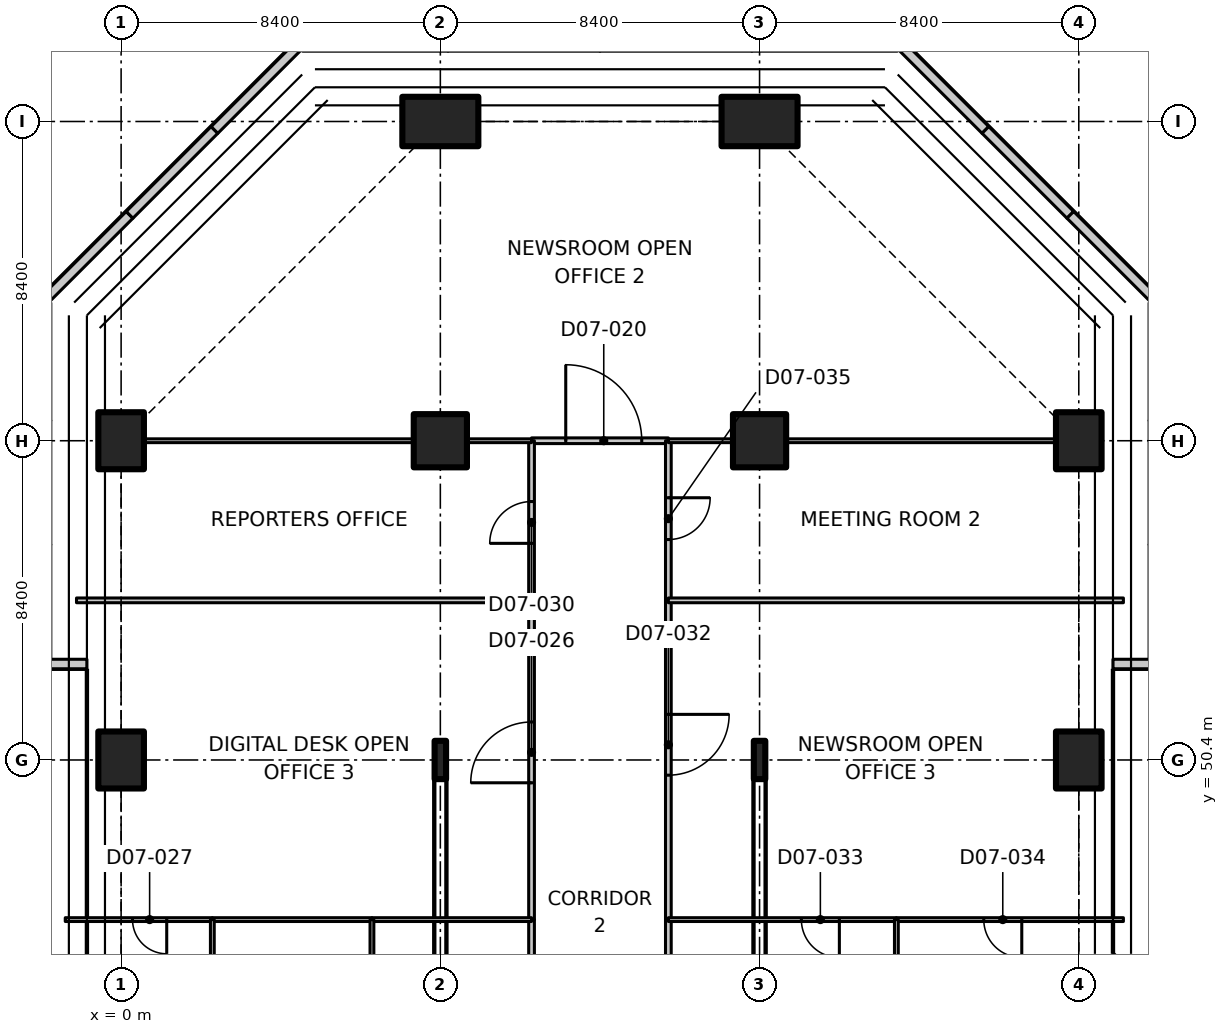
"""IFC4 building model, lengths in metres.
Left out: names, types, materials, properties, quantities, classifications, styles, units other than length and angle.
Written with IfcOpenShell. Run it as: python <this file> out.ifc"""

import sys

from ifc_helpers import new_model, si_unit, direction, frame, frame_2d, origin, origin_2d, place, context, subcontext, project, spatial, polyline, rectangle, i_section, outline, extrude, element, fill, save


model = new_model("IFC4")
c1 = context("Model", 3, precision=1e-05, world=origin(), true_north=direction((0.0, 1.0)))
c2 = subcontext(c1, "Body", "Model", "MODEL_VIEW")
j1 = project(units=[si_unit("LENGTHUNIT", "METRE"), si_unit("PLANEANGLEUNIT", "RADIAN")], contexts=[c1])
p1 = place(None, origin())
s1 = spatial("IfcSite", under=j1, at=p1, CompositionType="ELEMENT")
p2 = place(p1, origin())
s2 = spatial("IfcBuilding", under=s1, at=p2, CompositionType="ELEMENT")
p3 = place(p2, frame((0.0, 0.0, 36.5)))
s3 = spatial("IfcBuildingStorey", under=s2, at=p3, CompositionType="ELEMENT", Elevation=36.5)
for number, where, z_axis, x_axis in (
    (1, (0.0, 50.4, 0.0), (0.0, 0.0, 1.0), (1.0, 0.0, 0.0)),
    (2, (0.0, 58.8, 0.0), (0.0, 0.0, 1.0), (1.0, 0.0, 0.0)),
):
    element("IfcColumn", number, at=place(p3, frame(where, z_axis=z_axis, x_axis=x_axis)), inside=s3, PredefinedType="COLUMN", context=c2, shape_type="SweptSolid", body=[
        extrude(rectangle(XDim=1.2, YDim=1.5, at=origin_2d()), origin(), (0.0, 0.0, 1.0), 3.35),
    ])
p4 = place(p3, frame((8.4, 58.8, 0.0), z_axis=(0.0, 0.0, 1.0), x_axis=(1.0, 0.0, 0.0)))
e3 = element("IfcColumn", 3, at=p4, inside=s3, PredefinedType="COLUMN", context=c2, shape_type="SweptSolid", body=[
    extrude(rectangle(XDim=1.4, YDim=1.4, at=origin_2d()), origin(), (0.0, 0.0, 1.0), 3.35),
])
p5 = place(p3, frame((8.4, 67.2, 0.0), z_axis=(0.0, 0.0, 1.0), x_axis=(0.0, 1.0, 0.0)))
e4 = element("IfcColumn", 4, at=p5, inside=s3, PredefinedType="COLUMN", context=c2, shape_type="SweptSolid", body=[
    extrude(rectangle(XDim=1.3, YDim=2.0, at=origin_2d()), origin(), (0.0, 0.0, 1.0), 3.35),
])
p6 = place(p3, frame((16.8, 58.8, 0.0), z_axis=(0.0, 0.0, 1.0), x_axis=(1.0, 0.0, 0.0)))
e5 = element("IfcColumn", 5, at=p6, inside=s3, PredefinedType="COLUMN", context=c2, shape_type="SweptSolid", body=[
    extrude(rectangle(XDim=1.4, YDim=1.4, at=origin_2d()), origin(), (0.0, 0.0, 1.0), 3.35),
])
p7 = place(p3, frame((16.8, 67.2, 0.0), z_axis=(0.0, 0.0, 1.0), x_axis=(0.0, 1.0, 0.0)))
e6 = element("IfcColumn", 6, at=p7, inside=s3, PredefinedType="COLUMN", context=c2, shape_type="SweptSolid", body=[
    extrude(rectangle(XDim=1.3, YDim=2.0, at=origin_2d()), origin(), (0.0, 0.0, 1.0), 3.35),
])
for number, where, z_axis, x_axis in (
    (7, (25.2, 50.4, 0.0), (0.0, 0.0, 1.0), (1.0, 0.0, 0.0)),
    (8, (25.2, 58.8, 0.0), (0.0, 0.0, 1.0), (1.0, 0.0, 0.0)),
):
    element("IfcColumn", number, at=place(p3, frame(where, z_axis=z_axis, x_axis=x_axis)), inside=s3, PredefinedType="COLUMN", context=c2, shape_type="SweptSolid", body=[
        extrude(rectangle(XDim=1.2, YDim=1.5, at=origin_2d()), origin(), (0.0, 0.0, 1.0), 3.35),
    ])
for number, where, z_axis, x_axis in (
    (9, (8.4, 50.4, -0.25), (0.0, 0.0, 1.0), (1.0, 0.0, 0.0)),
    (10, (16.8, 50.4, -0.25), (0.0, 0.0, 1.0), (1.0, 0.0, 0.0)),
):
    element("IfcColumn", number, at=place(p3, frame(where, z_axis=z_axis, x_axis=x_axis)), inside=s3, PredefinedType="COLUMN", context=c2, shape_type="SweptSolid", body=[
        extrude(i_section(OverallWidth=0.302, OverallDepth=1.008, WebThickness=0.021, FlangeThickness=0.04, FilletRadius=0.03, at=origin_2d()), origin(), (0.0, 0.0, 1.0), 3.725),
    ])
p8 = place(p3, frame((-2.012, 62.509, 0.0), z_axis=(0.0, 0.0, 1.0), x_axis=(0.707145413513, 0.70706814675, 0.0)))
e11 = element("IfcWall", 11, at=p8, inside=s3, PredefinedType="PARAPET", context=c2, shape_type="SweptSolid", body=[
    extrude(rectangle(XDim=3.16, YDim=0.25, at=frame_2d((1.58, 0.0))), origin(), (0.0, 0.0, 1.0), 1.1),
])
for number, where, z_axis, x_axis in (
    (12, (0.223, 64.743, 0.0), (0.0, 0.0, 1.0), (0.707, 0.707, 0.0)),
    (13, (2.457, 66.977, 0.0), (0.0, 0.0, 1.0), (0.707, 0.707, 0.0)),
):
    element("IfcWall", number, at=place(p3, frame(where, z_axis=z_axis, x_axis=x_axis)), inside=s3, PredefinedType="PARAPET", context=c2, shape_type="SweptSolid", body=[
        extrude(rectangle(XDim=3.16, YDim=0.25, at=frame_2d((1.58, 0.0))), origin(), (0.0, 0.0, 1.0), 1.1),
    ])
p9 = place(p3, frame((20.509, 69.212, 0.0), z_axis=(0.0, 0.0, 1.0), x_axis=(0.70706814675, -0.707145413513, 0.0)))
e14 = element("IfcWall", 14, at=p9, inside=s3, PredefinedType="PARAPET", context=c2, shape_type="SweptSolid", body=[
    extrude(rectangle(XDim=3.16, YDim=0.25, at=frame_2d((1.58, 0.0))), origin(), (0.0, 0.0, 1.0), 1.1),
])
p10 = place(p3, frame((22.743, 66.977, 0.0), z_axis=(0.0, 0.0, 1.0), x_axis=(0.707106781187, -0.707106781187, 0.0)))
e15 = element("IfcWall", 15, at=p10, inside=s3, PredefinedType="PARAPET", context=c2, shape_type="SweptSolid", body=[
    extrude(rectangle(XDim=3.16, YDim=0.25, at=frame_2d((1.58, 0.0))), origin(), (0.0, 0.0, 1.0), 1.1),
])
p11 = place(p3, frame((24.977, 64.743, 0.0), z_axis=(0.0, 0.0, 1.0), x_axis=(0.707145413513, -0.70706814675, 0.0)))
e16 = element("IfcWall", 16, at=p11, inside=s3, PredefinedType="PARAPET", context=c2, shape_type="SweptSolid", body=[
    extrude(rectangle(XDim=3.16, YDim=0.25, at=frame_2d((1.58, 0.0))), origin(), (0.0, 0.0, 1.0), 1.1),
])
p12 = place(p3, frame((27.3, 52.925, 0.0), z_axis=(0.0, 0.0, 1.0), x_axis=(-1.0, 0.0, 0.0)))
e17 = element("IfcWall", 17, at=p12, inside=s3, PredefinedType="PARAPET", context=c2, shape_type="SweptSolid", body=[
    extrude(rectangle(XDim=1.2, YDim=0.25, at=frame_2d((0.6, 0.0))), origin(), (0.0, 0.0, 1.0), 1.1),
])
p13 = place(p3, frame((-0.9, 52.925, 0.0), z_axis=(0.0, 0.0, 1.0), x_axis=(-1.0, 0.0, 0.0)))
e18 = element("IfcWall", 18, at=p13, inside=s3, PredefinedType="PARAPET", context=c2, shape_type="SweptSolid", body=[
    extrude(rectangle(XDim=1.2, YDim=0.25, at=frame_2d((0.6, 0.0))), origin(), (0.0, 0.0, 1.0), 1.1),
])
p14 = place(p3, frame((10.8, 58.8, 0.0), z_axis=(0.0, 0.0, 1.0), x_axis=(1.0, 0.0, 0.0)))
e19 = element("IfcWall", 19, at=p14, inside=s3, PredefinedType="PARTITIONING", context=c2, shape_type="SweptSolid", body=[
    extrude(rectangle(XDim=3.6, YDim=0.15, at=frame_2d((1.8, 0.0))), origin(), (0.0, 0.0, 1.0), 3.33),
])
p15 = place(p14, frame((0.9, 0.0, 0.0)))
e20 = element("IfcOpeningElement", 20, at=p15, cuts=e19, PredefinedType="OPENING", context=c2, shape_type="SweptSolid", body=[
    extrude(rectangle(XDim=2.0, YDim=2.4, at=frame_2d((1.0, 1.2))), frame((0.0, 0.085, 0.0), z_axis=(0.0, -1.0, 0.0), x_axis=(1.0, 0.0, 0.0)), (0.0, 0.0, 1.0), 0.17),
])
p16 = place(p3, frame((10.8, 46.2, 0.0), z_axis=(0.0, 0.0, 1.0), x_axis=(0.0, 1.0, 0.0)))
e21 = element("IfcWall", 21, at=p16, inside=s3, PredefinedType="PARTITIONING", context=c2, shape_type="SweptSolid", body=[
    extrude(rectangle(XDim=8.4, YDim=0.15, at=frame_2d((4.2, 0.0))), origin(), (0.0, 0.0, 1.0), 3.33),
])
p17 = place(p16, frame((3.6, 0.0, 0.0)))
e22 = element("IfcOpeningElement", 22, at=p17, cuts=e21, PredefinedType="OPENING", context=c2, shape_type="SweptSolid", body=[
    extrude(rectangle(XDim=1.6, YDim=2.1, at=frame_2d((0.8, 1.05))), frame((0.0, 0.085, 0.0), z_axis=(0.0, -1.0, 0.0), x_axis=(1.0, 0.0, 0.0)), (0.0, 0.0, 1.0), 0.17),
])
p18 = place(p3, frame((10.8, 42.0, 0.0), z_axis=(0.0, 0.0, 1.0), x_axis=(0.0, 1.0, 0.0)))
e23 = element("IfcWall", 23, at=p18, inside=s3, PredefinedType="PARTITIONING", context=c2, shape_type="SweptSolid", body=[
    extrude(rectangle(XDim=4.2, YDim=0.15, at=frame_2d((2.1, 0.0))), origin(), (0.0, 0.0, 1.0), 3.33),
])
p19 = place(p3, frame((10.8, 54.6, 0.0), z_axis=(0.0, 0.0, 1.0), x_axis=(0.0, 1.0, 0.0)))
e24 = element("IfcWall", 24, at=p19, inside=s3, PredefinedType="PARTITIONING", context=c2, shape_type="SweptSolid", body=[
    extrude(rectangle(XDim=4.2, YDim=0.15, at=frame_2d((2.1, 0.0))), origin(), (0.0, 0.0, 1.0), 3.33),
])
p20 = place(p19, frame((1.5, 0.0, 0.0)))
e25 = element("IfcOpeningElement", 25, at=p20, cuts=e24, PredefinedType="OPENING", context=c2, shape_type="SweptSolid", body=[
    extrude(rectangle(XDim=1.1, YDim=2.1, at=frame_2d((0.55, 1.05))), frame((0.0, 0.085, 0.0), z_axis=(0.0, -1.0, 0.0), x_axis=(1.0, 0.0, 0.0)), (0.0, 0.0, 1.0), 0.17),
])
p21 = place(p3, frame((14.4, 54.6, 0.0), z_axis=(0.0, 0.0, 1.0), x_axis=(0.0, -1.0, 0.0)))
e26 = element("IfcWall", 26, at=p21, inside=s3, PredefinedType="PARTITIONING", context=c2, shape_type="SweptSolid", body=[
    extrude(rectangle(XDim=8.4, YDim=0.15, at=frame_2d((4.2, 0.0))), origin(), (0.0, 0.0, 1.0), 3.33),
])
p22 = place(p21, frame((3.0, 0.0, 0.0)))
e27 = element("IfcOpeningElement", 27, at=p22, cuts=e26, PredefinedType="OPENING", context=c2, shape_type="SweptSolid", body=[
    extrude(rectangle(XDim=1.6, YDim=2.1, at=frame_2d((0.8, 1.05))), frame((0.0, 0.085, 0.0), z_axis=(0.0, -1.0, 0.0), x_axis=(1.0, 0.0, 0.0)), (0.0, 0.0, 1.0), 0.17),
])
p23 = place(p3, frame((14.4, 46.2, 0.0), z_axis=(0.0, 0.0, 1.0), x_axis=(0.0, -1.0, 0.0)))
e28 = element("IfcWall", 28, at=p23, inside=s3, PredefinedType="PARTITIONING", context=c2, shape_type="SweptSolid", body=[
    extrude(rectangle(XDim=4.2, YDim=0.15, at=frame_2d((2.1, 0.0))), origin(), (0.0, 0.0, 1.0), 3.33),
])
p24 = place(p3, frame((14.4, 58.8, 0.0), z_axis=(0.0, 0.0, 1.0), x_axis=(0.0, -1.0, 0.0)))
e29 = element("IfcWall", 29, at=p24, inside=s3, PredefinedType="PARTITIONING", context=c2, shape_type="SweptSolid", body=[
    extrude(rectangle(XDim=4.2, YDim=0.15, at=frame_2d((2.1, 0.0))), origin(), (0.0, 0.0, 1.0), 3.33),
])
p25 = place(p24, frame((1.5, 0.0, 0.0)))
e30 = element("IfcOpeningElement", 30, at=p25, cuts=e29, PredefinedType="OPENING", context=c2, shape_type="SweptSolid", body=[
    extrude(rectangle(XDim=1.1, YDim=2.1, at=frame_2d((0.55, 1.05))), frame((0.0, 0.085, 0.0), z_axis=(0.0, -1.0, 0.0), x_axis=(1.0, 0.0, 0.0)), (0.0, 0.0, 1.0), 0.17),
])
p26 = place(p3, frame((10.8, 58.8, 0.0), z_axis=(0.0, 0.0, 1.0), x_axis=(-1.0, 0.0, 0.0)))
e31 = element("IfcWall", 31, at=p26, inside=s3, PredefinedType="PARTITIONING", context=c2, shape_type="SweptSolid", body=[
    extrude(rectangle(XDim=1.68, YDim=0.1, at=frame_2d((0.84, 0.0))), origin(), (0.0, 0.0, 1.0), 3.33),
])
p27 = place(p3, frame((7.68, 58.8, 0.0), z_axis=(0.0, 0.0, 1.0), x_axis=(-1.0, 0.0, 0.0)))
e32 = element("IfcWall", 32, at=p27, inside=s3, PredefinedType="PARTITIONING", context=c2, shape_type="SweptSolid", body=[
    extrude(rectangle(XDim=7.06, YDim=0.1, at=frame_2d((3.53, 0.0))), origin(), (0.0, 0.0, 1.0), 3.33),
])
p28 = place(p3, frame((24.58, 58.8, 0.0), z_axis=(0.0, 0.0, 1.0), x_axis=(-1.0, 0.0, 0.0)))
e33 = element("IfcWall", 33, at=p28, inside=s3, PredefinedType="PARTITIONING", context=c2, shape_type="SweptSolid", body=[
    extrude(rectangle(XDim=7.06, YDim=0.1, at=frame_2d((3.53, 0.0))), origin(), (0.0, 0.0, 1.0), 3.33),
])
p29 = place(p3, frame((16.08, 58.8, 0.0), z_axis=(0.0, 0.0, 1.0), x_axis=(-1.0, 0.0, 0.0)))
e34 = element("IfcWall", 34, at=p29, inside=s3, PredefinedType="PARTITIONING", context=c2, shape_type="SweptSolid", body=[
    extrude(rectangle(XDim=1.68, YDim=0.1, at=frame_2d((0.84, 0.0))), origin(), (0.0, 0.0, 1.0), 3.33),
])
p30 = place(p3, frame((2.4, 46.2, 0.0), z_axis=(0.0, 0.0, 1.0), x_axis=(-1.0, 0.0, 0.0)))
e35 = element("IfcWall", 35, at=p30, inside=s3, PredefinedType="PARTITIONING", context=c2, shape_type="SweptSolid", body=[
    extrude(rectangle(XDim=3.87, YDim=0.1, at=frame_2d((1.935, 0.0))), origin(), (0.0, 0.0, 1.0), 2.98),
])
p31 = place(p30, frame((1.2, 0.0, 0.0)))
e36 = element("IfcOpeningElement", 36, at=p31, cuts=e35, PredefinedType="OPENING", context=c2, shape_type="SweptSolid", body=[
    extrude(rectangle(XDim=0.9, YDim=2.1, at=frame_2d((0.45, 1.05))), frame((0.0, 0.06, 0.0), z_axis=(0.0, -1.0, 0.0), x_axis=(1.0, 0.0, 0.0)), (0.0, 0.0, 1.0), 0.12),
])
p32 = place(p3, frame((6.6, 46.2, 0.0), z_axis=(0.0, 0.0, 1.0), x_axis=(-1.0, 0.0, 0.0)))
e37 = element("IfcWall", 37, at=p32, inside=s3, PredefinedType="PARTITIONING", context=c2, shape_type="SweptSolid", body=[
    extrude(rectangle(XDim=4.2, YDim=0.1, at=frame_2d((2.1, 0.0))), origin(), (0.0, 0.0, 1.0), 3.33),
])
p33 = place(p3, frame((10.8, 46.2, 0.0), z_axis=(0.0, 0.0, 1.0), x_axis=(-1.0, 0.0, 0.0)))
e38 = element("IfcWall", 38, at=p33, inside=s3, PredefinedType="PARTITIONING", context=c2, shape_type="SweptSolid", body=[
    extrude(rectangle(XDim=4.2, YDim=0.1, at=frame_2d((2.1, 0.0))), origin(), (0.0, 0.0, 1.0), 3.33),
])
p34 = place(p3, frame((-1.174, 54.6, 0.0), z_axis=(0.0, 0.0, 1.0), x_axis=(1.0, 0.0, 0.0)))
e39 = element("IfcWall", 39, at=p34, inside=s3, PredefinedType="PARTITIONING", context=c2, shape_type="SweptSolid", body=[
    extrude(outline(polyline([(0.0, 0.0), (11.974, 0.0), (11.974, 3.33), (1.624, 3.33), (1.622, 2.98), (0.726, 2.98), (0.724, 3.33), (0.074, 3.33), (0.0, 3.33), (0.0, 0.0)])), frame((0.0, 0.062, 0.0), z_axis=(0.0, -1.0, 0.0), x_axis=(1.0, 0.0, 0.0)), (0.0, 0.0, 1.0), 0.125),
])
p35 = place(p3, frame((2.4, 46.2, 0.0), z_axis=(0.0, 0.0, 1.0), x_axis=(0.0, -1.0, 0.0)))
e40 = element("IfcWall", 40, at=p35, inside=s3, PredefinedType="PARTITIONING", context=c2, shape_type="SweptSolid", body=[
    extrude(rectangle(XDim=4.2, YDim=0.1, at=frame_2d((2.1, 0.0))), origin(), (0.0, 0.0, 1.0), 3.33),
])
p36 = place(p35, frame((1.8, 0.0, 0.0)))
e41 = element("IfcOpeningElement", 41, at=p36, cuts=e40, PredefinedType="OPENING", context=c2, shape_type="SweptSolid", body=[
    extrude(rectangle(XDim=0.9, YDim=2.1, at=frame_2d((0.45, 1.05))), frame((0.0, 0.06, 0.0), z_axis=(0.0, -1.0, 0.0), x_axis=(1.0, 0.0, 0.0)), (0.0, 0.0, 1.0), 0.12),
])
p37 = place(p3, frame((6.6, 46.2, 0.0), z_axis=(0.0, 0.0, 1.0), x_axis=(0.0, -1.0, 0.0)))
e42 = element("IfcWall", 42, at=p37, inside=s3, PredefinedType="PARTITIONING", context=c2, shape_type="SweptSolid", body=[
    extrude(rectangle(XDim=4.2, YDim=0.1, at=frame_2d((2.1, 0.0))), origin(), (0.0, 0.0, 1.0), 3.33),
])
p38 = place(p3, frame((20.4, 46.2, 0.0), z_axis=(0.0, 0.0, 1.0), x_axis=(-1.0, 0.0, 0.0)))
e43 = element("IfcWall", 43, at=p38, inside=s3, PredefinedType="PARTITIONING", context=c2, shape_type="SweptSolid", body=[
    extrude(rectangle(XDim=6.0, YDim=0.1, at=frame_2d((3.0, 0.0))), origin(), (0.0, 0.0, 1.0), 3.33),
])
p39 = place(p38, frame((1.5, 0.0, 0.0)))
e44 = element("IfcOpeningElement", 44, at=p39, cuts=e43, PredefinedType="OPENING", context=c2, shape_type="SweptSolid", body=[
    extrude(rectangle(XDim=1.0, YDim=2.1, at=frame_2d((0.5, 1.05))), frame((0.0, 0.06, 0.0), z_axis=(0.0, -1.0, 0.0), x_axis=(1.0, 0.0, 0.0)), (0.0, 0.0, 1.0), 0.12),
])
p40 = place(p3, frame((26.374, 46.2, 0.0), z_axis=(0.0, 0.0, 1.0), x_axis=(-1.0, 0.0, 0.0)))
e45 = element("IfcWall", 45, at=p40, inside=s3, PredefinedType="PARTITIONING", context=c2, shape_type="SweptSolid", body=[
    extrude(outline(polyline([(0.0, 0.0), (5.974, 0.0), (5.974, 3.33), (1.624, 3.33), (1.622, 2.98), (0.726, 2.98), (0.724, 3.33), (0.074, 3.33), (0.0, 3.33), (0.0, 0.0)])), frame((0.0, 0.05, 0.0), z_axis=(0.0, -1.0, 0.0), x_axis=(1.0, 0.0, 0.0)), (0.0, 0.0, 1.0), 0.1),
])
p41 = place(p40, frame((2.674, 0.0, 0.0)))
e46 = element("IfcOpeningElement", 46, at=p41, cuts=e45, PredefinedType="OPENING", context=c2, shape_type="SweptSolid", body=[
    extrude(rectangle(XDim=1.0, YDim=2.1, at=frame_2d((0.5, 1.05))), frame((0.0, 0.06, 0.0), z_axis=(0.0, -1.0, 0.0), x_axis=(1.0, 0.0, 0.0)), (0.0, 0.0, 1.0), 0.12),
])
p42 = place(p3, frame((14.4, 54.6, 0.0), z_axis=(0.0, 0.0, 1.0), x_axis=(1.0, 0.0, 0.0)))
e47 = element("IfcWall", 47, at=p42, inside=s3, PredefinedType="PARTITIONING", context=c2, shape_type="SweptSolid", body=[
    extrude(outline(polyline([(0.0, 0.0), (11.974, 0.0), (11.974, 3.33), (11.9, 3.33), (11.25, 3.33), (11.248, 2.98), (10.352, 2.98), (10.35, 3.33), (0.0, 3.33), (0.0, 0.0)])), frame((0.0, 0.062, 0.0), z_axis=(0.0, -1.0, 0.0), x_axis=(1.0, 0.0, 0.0)), (0.0, 0.0, 1.0), 0.125),
])
p43 = place(p3, frame((20.4, 46.2, 0.0), z_axis=(0.0, 0.0, 1.0), x_axis=(0.0, -1.0, 0.0)))
e48 = element("IfcWall", 48, at=p43, inside=s3, PredefinedType="PARTITIONING", context=c2, shape_type="SweptSolid", body=[
    extrude(rectangle(XDim=4.2, YDim=0.1, at=frame_2d((2.1, 0.0))), origin(), (0.0, 0.0, 1.0), 3.33),
])
p44 = place(p15, origin())
e49 = element("IfcDoor", 49, at=p44, inside=s3, OperationType="DOUBLE_DOOR_SINGLE_SWING", PredefinedType="DOOR", context=c2, shape_type="SweptSolid", body=[
    extrude(rectangle(XDim=2.0, YDim=2.4, at=frame_2d((1.0, 1.2))), frame((0.0, 0.025, 0.0), z_axis=(0.0, -1.0, 0.0), x_axis=(1.0, 0.0, 0.0)), (0.0, 0.0, 1.0), 0.05),
])
fill(e20, e49)
p45 = place(p17, origin())
e50 = element("IfcDoor", 50, at=p45, inside=s3, OperationType="DOUBLE_DOOR_SINGLE_SWING", PredefinedType="DOOR", context=c2, shape_type="SweptSolid", body=[
    extrude(rectangle(XDim=1.6, YDim=2.1, at=frame_2d((0.8, 1.05))), frame((0.0, 0.025, 0.0), z_axis=(0.0, -1.0, 0.0), x_axis=(1.0, 0.0, 0.0)), (0.0, 0.0, 1.0), 0.05),
])
fill(e22, e50)
p46 = place(p31, origin())
e51 = element("IfcDoor", 51, at=p46, inside=s3, OperationType="SINGLE_SWING_LEFT", PredefinedType="DOOR", context=c2, shape_type="SweptSolid", body=[
    extrude(rectangle(XDim=0.9, YDim=2.1, at=frame_2d((0.45, 1.05))), frame((0.0, 0.025, 0.0), z_axis=(0.0, -1.0, 0.0), x_axis=(1.0, 0.0, 0.0)), (0.0, 0.0, 1.0), 0.05),
])
fill(e36, e51)
p47 = place(p20, origin())
e52 = element("IfcDoor", 52, at=p47, inside=s3, OperationType="SINGLE_SWING_LEFT", PredefinedType="DOOR", context=c2, shape_type="SweptSolid", body=[
    extrude(rectangle(XDim=1.1, YDim=2.1, at=frame_2d((0.55, 1.05))), frame((0.0, 0.025, 0.0), z_axis=(0.0, -1.0, 0.0), x_axis=(1.0, 0.0, 0.0)), (0.0, 0.0, 1.0), 0.05),
])
fill(e25, e52)
p48 = place(p22, origin())
e53 = element("IfcDoor", 53, at=p48, inside=s3, OperationType="DOUBLE_DOOR_SINGLE_SWING", PredefinedType="DOOR", context=c2, shape_type="SweptSolid", body=[
    extrude(rectangle(XDim=1.6, YDim=2.1, at=frame_2d((0.8, 1.05))), frame((0.0, 0.025, 0.0), z_axis=(0.0, -1.0, 0.0), x_axis=(1.0, 0.0, 0.0)), (0.0, 0.0, 1.0), 0.05),
])
fill(e27, e53)
p49 = place(p39, origin())
e54 = element("IfcDoor", 54, at=p49, inside=s3, OperationType="SINGLE_SWING_LEFT", PredefinedType="DOOR", context=c2, shape_type="SweptSolid", body=[
    extrude(rectangle(XDim=1.0, YDim=2.1, at=frame_2d((0.5, 1.05))), frame((0.0, 0.025, 0.0), z_axis=(0.0, -1.0, 0.0), x_axis=(1.0, 0.0, 0.0)), (0.0, 0.0, 1.0), 0.05),
])
fill(e44, e54)
p50 = place(p41, origin())
e55 = element("IfcDoor", 55, at=p50, inside=s3, OperationType="SINGLE_SWING_LEFT", PredefinedType="DOOR", context=c2, shape_type="SweptSolid", body=[
    extrude(rectangle(XDim=1.0, YDim=2.1, at=frame_2d((0.5, 1.05))), frame((0.0, 0.025, 0.0), z_axis=(0.0, -1.0, 0.0), x_axis=(1.0, 0.0, 0.0)), (0.0, 0.0, 1.0), 0.05),
])
fill(e46, e55)
p51 = place(p25, origin())
e56 = element("IfcDoor", 56, at=p51, inside=s3, OperationType="SINGLE_SWING_LEFT", PredefinedType="DOOR", context=c2, shape_type="SweptSolid", body=[
    extrude(rectangle(XDim=1.1, YDim=2.1, at=frame_2d((0.55, 1.05))), frame((0.0, 0.025, 0.0), z_axis=(0.0, -1.0, 0.0), x_axis=(1.0, 0.0, 0.0)), (0.0, 0.0, 1.0), 0.05),
])
fill(e30, e56)
save(model, sys.argv[1])
